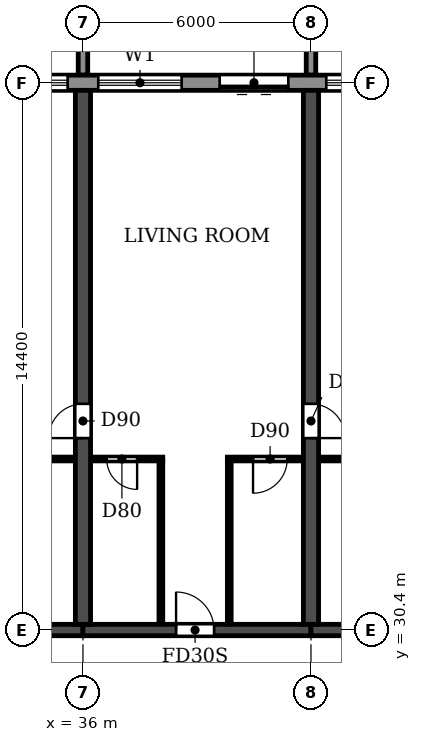
"""IFC4 building model, lengths in metres.
Left out: names, types, materials, properties, quantities, classifications, styles, units other than length and angle.
Written with IfcOpenShell. Run it as: python <this file> out.ifc"""

import sys

from ifc_helpers import new_model, si_unit, direction, frame, frame_2d, origin, place, context, subcontext, project, spatial, polyline, rectangle, outline, extrude, source, transform, mapped, element, fill, save


model = new_model("IFC4")
c1 = context("Model", 3, precision=1e-05, world=origin(), true_north=direction((0.0, 1.0)))
c2 = subcontext(c1, "Body", "Model", "MODEL_VIEW")
j1 = project(units=[si_unit("LENGTHUNIT", "METRE"), si_unit("PLANEANGLEUNIT", "RADIAN")], contexts=[c1])
p1 = place(None, origin())
s1 = spatial("IfcSite", under=j1, at=p1, CompositionType="ELEMENT")
p2 = place(p1, origin())
s2 = spatial("IfcBuilding", under=s1, at=p2, CompositionType="ELEMENT")
p3 = place(p2, frame((0.0, 0.0, 33.3)))
s3 = spatial("IfcBuildingStorey", under=s2, at=p3, CompositionType="ELEMENT", Elevation=33.3)
p4 = place(p3, frame((36.0, 30.55, 0.0), z_axis=(0.0, 0.0, 1.0), x_axis=(0.0, 1.0, 0.0)))
e1 = element("IfcWall", 1, at=p4, inside=s3, PredefinedType="SHEAR", context=c2, shape_type="SweptSolid", body=[
    extrude(rectangle(XDim=14.05, YDim=0.4, at=frame_2d((7.025, 0.0))), origin(), (0.0, 0.0, 1.0), 3.05),
])
p5 = place(p4, frame((4.9, 0.0, 0.0)))
e2 = element("IfcOpeningElement", 2, at=p5, cuts=e1, PredefinedType="OPENING", context=c2, shape_type="SweptSolid", body=[
    extrude(rectangle(XDim=0.9, YDim=2.1, at=frame_2d((0.45, 1.05))), frame((0.0, 0.21, 0.0), z_axis=(0.0, -1.0, 0.0), x_axis=(1.0, 0.0, 0.0)), (0.0, 0.0, 1.0), 0.42),
])
p6 = place(p3, frame((42.0, 30.55, 0.0), z_axis=(0.0, 0.0, 1.0), x_axis=(0.0, 1.0, 0.0)))
e3 = element("IfcWall", 3, at=p6, inside=s3, PredefinedType="SHEAR", context=c2, shape_type="SweptSolid", body=[
    extrude(rectangle(XDim=14.05, YDim=0.4, at=frame_2d((7.025, 0.0))), origin(), (0.0, 0.0, 1.0), 3.05),
])
p7 = place(p6, frame((4.9, 0.0, 0.0)))
e4 = element("IfcOpeningElement", 4, at=p7, cuts=e3, PredefinedType="OPENING", context=c2, shape_type="SweptSolid", body=[
    extrude(rectangle(XDim=0.9, YDim=2.1, at=frame_2d((0.45, 1.05))), frame((0.0, 0.21, 0.0), z_axis=(0.0, -1.0, 0.0), x_axis=(1.0, 0.0, 0.0)), (0.0, 0.0, 1.0), 0.42),
])
p8 = place(p3, frame((30.0, 30.4, 0.0), z_axis=(0.0, 0.0, 1.0), x_axis=(1.0, 0.0, 0.0)))
e5 = element("IfcWall", 5, at=p8, inside=s3, PredefinedType="SHEAR", context=c2, shape_type="SweptSolid", body=[
    extrude(rectangle(XDim=6.0, YDim=0.3, at=frame_2d((3.0, 0.0))), origin(), (0.0, 0.0, 1.0), 2.45),
])
p9 = place(p3, frame((36.0, 30.4, 0.0), z_axis=(0.0, 0.0, 1.0), x_axis=(1.0, 0.0, 0.0)))
e6 = element("IfcWall", 6, at=p9, inside=s3, PredefinedType="SHEAR", context=c2, shape_type="SweptSolid", body=[
    extrude(rectangle(XDim=6.0, YDim=0.3, at=frame_2d((3.0, 0.0))), origin(), (0.0, 0.0, 1.0), 2.45),
])
p10 = place(p9, frame((2.45, 0.0, 0.0)))
e7 = element("IfcOpeningElement", 7, at=p10, cuts=e6, PredefinedType="OPENING", context=c2, shape_type="SweptSolid", body=[
    extrude(rectangle(XDim=1.0, YDim=2.1, at=frame_2d((0.5, 1.05))), frame((0.0, 0.16, 0.0), z_axis=(0.0, -1.0, 0.0), x_axis=(1.0, 0.0, 0.0)), (0.0, 0.0, 1.0), 0.32),
])
p11 = place(p3, frame((42.0, 30.4, 0.0), z_axis=(0.0, 0.0, 1.0), x_axis=(1.0, 0.0, 0.0)))
e8 = element("IfcWall", 8, at=p11, inside=s3, PredefinedType="SHEAR", context=c2, shape_type="SweptSolid", body=[
    extrude(rectangle(XDim=6.0, YDim=0.3, at=frame_2d((3.0, 0.0))), origin(), (0.0, 0.0, 1.0), 2.45),
])
p12 = place(p3, frame((97.317, 44.8, 0.0), z_axis=(0.0, 0.0, 1.0), x_axis=(-1.0, 0.0, 0.0)))
e9 = element("IfcWall", 9, at=p12, inside=s3, PredefinedType="STANDARD", context=c2, shape_type="SweptSolid", body=[
    extrude(rectangle(XDim=92.634, YDim=0.4, at=frame_2d((46.317, 0.0))), origin(), (0.0, 0.0, 1.0), 3.05),
])
p13 = place(p12, frame((88.717, 0.0, 0.9)))
e10 = element("IfcOpeningElement", 10, at=p13, cuts=e9, PredefinedType="OPENING", context=c2, shape_type="SweptSolid", body=[
    extrude(rectangle(XDim=2.2, YDim=1.5, at=frame_2d((1.1, 0.75))), frame((0.0, 0.21, 0.0), z_axis=(0.0, -1.0, 0.0), x_axis=(1.0, 0.0, 0.0)), (0.0, 0.0, 1.0), 0.42),
])
p14 = place(p12, frame((85.917, 0.0, 0.0)))
e11 = element("IfcOpeningElement", 11, at=p14, cuts=e9, PredefinedType="OPENING", context=c2, shape_type="SweptSolid", body=[
    extrude(rectangle(XDim=1.8, YDim=2.4, at=frame_2d((0.9, 1.2))), frame((0.0, 0.21, 0.0), z_axis=(0.0, -1.0, 0.0), x_axis=(1.0, 0.0, 0.0)), (0.0, 0.0, 1.0), 0.42),
])
p15 = place(p12, frame((82.717, 0.0, 0.9)))
e12 = element("IfcOpeningElement", 12, at=p15, cuts=e9, PredefinedType="OPENING", context=c2, shape_type="SweptSolid", body=[
    extrude(rectangle(XDim=2.2, YDim=1.5, at=frame_2d((1.1, 0.75))), frame((0.0, 0.21, 0.0), z_axis=(0.0, -1.0, 0.0), x_axis=(1.0, 0.0, 0.0)), (0.0, 0.0, 1.0), 0.42),
])
p16 = place(p12, frame((79.917, 0.0, 0.0)))
e13 = element("IfcOpeningElement", 13, at=p16, cuts=e9, PredefinedType="OPENING", context=c2, shape_type="SweptSolid", body=[
    extrude(rectangle(XDim=1.8, YDim=2.4, at=frame_2d((0.9, 1.2))), frame((0.0, 0.21, 0.0), z_axis=(0.0, -1.0, 0.0), x_axis=(1.0, 0.0, 0.0)), (0.0, 0.0, 1.0), 0.42),
])
p17 = place(p12, frame((76.717, 0.0, 0.9)))
e14 = element("IfcOpeningElement", 14, at=p17, cuts=e9, PredefinedType="OPENING", context=c2, shape_type="SweptSolid", body=[
    extrude(rectangle(XDim=2.2, YDim=1.5, at=frame_2d((1.1, 0.75))), frame((0.0, 0.21, 0.0), z_axis=(0.0, -1.0, 0.0), x_axis=(1.0, 0.0, 0.0)), (0.0, 0.0, 1.0), 0.42),
])
p18 = place(p12, frame((73.717, 0.0, 0.9)))
e15 = element("IfcOpeningElement", 15, at=p18, cuts=e9, PredefinedType="OPENING", context=c2, shape_type="SweptSolid", body=[
    extrude(rectangle(XDim=2.2, YDim=1.5, at=frame_2d((1.1, 0.75))), frame((0.0, 0.21, 0.0), z_axis=(0.0, -1.0, 0.0), x_axis=(1.0, 0.0, 0.0)), (0.0, 0.0, 1.0), 0.42),
])
p19 = place(p12, frame((70.717, 0.0, 0.9)))
e16 = element("IfcOpeningElement", 16, at=p19, cuts=e9, PredefinedType="OPENING", context=c2, shape_type="SweptSolid", body=[
    extrude(rectangle(XDim=2.2, YDim=1.5, at=frame_2d((1.1, 0.75))), frame((0.0, 0.21, 0.0), z_axis=(0.0, -1.0, 0.0), x_axis=(1.0, 0.0, 0.0)), (0.0, 0.0, 1.0), 0.42),
])
p20 = place(p12, frame((67.917, 0.0, 0.0)))
e17 = element("IfcOpeningElement", 17, at=p20, cuts=e9, PredefinedType="OPENING", context=c2, shape_type="SweptSolid", body=[
    extrude(rectangle(XDim=1.8, YDim=2.4, at=frame_2d((0.9, 1.2))), frame((0.0, 0.21, 0.0), z_axis=(0.0, -1.0, 0.0), x_axis=(1.0, 0.0, 0.0)), (0.0, 0.0, 1.0), 0.42),
])
p21 = place(p12, frame((64.717, 0.0, 0.9)))
e18 = element("IfcOpeningElement", 18, at=p21, cuts=e9, PredefinedType="OPENING", context=c2, shape_type="SweptSolid", body=[
    extrude(rectangle(XDim=2.2, YDim=1.5, at=frame_2d((1.1, 0.75))), frame((0.0, 0.21, 0.0), z_axis=(0.0, -1.0, 0.0), x_axis=(1.0, 0.0, 0.0)), (0.0, 0.0, 1.0), 0.42),
])
p22 = place(p12, frame((61.717, 0.0, 0.9)))
e19 = element("IfcOpeningElement", 19, at=p22, cuts=e9, PredefinedType="OPENING", context=c2, shape_type="SweptSolid", body=[
    extrude(rectangle(XDim=2.2, YDim=1.5, at=frame_2d((1.1, 0.75))), frame((0.0, 0.21, 0.0), z_axis=(0.0, -1.0, 0.0), x_axis=(1.0, 0.0, 0.0)), (0.0, 0.0, 1.0), 0.42),
])
p23 = place(p12, frame((58.717, 0.0, 0.9)))
e20 = element("IfcOpeningElement", 20, at=p23, cuts=e9, PredefinedType="OPENING", context=c2, shape_type="SweptSolid", body=[
    extrude(rectangle(XDim=2.2, YDim=1.5, at=frame_2d((1.1, 0.75))), frame((0.0, 0.21, 0.0), z_axis=(0.0, -1.0, 0.0), x_axis=(1.0, 0.0, 0.0)), (0.0, 0.0, 1.0), 0.42),
])
p24 = place(p12, frame((55.917, 0.0, 0.0)))
e21 = element("IfcOpeningElement", 21, at=p24, cuts=e9, PredefinedType="OPENING", context=c2, shape_type="SweptSolid", body=[
    extrude(rectangle(XDim=1.8, YDim=2.4, at=frame_2d((0.9, 1.2))), frame((0.0, 0.21, 0.0), z_axis=(0.0, -1.0, 0.0), x_axis=(1.0, 0.0, 0.0)), (0.0, 0.0, 1.0), 0.42),
])
p25 = place(p12, frame((52.717, 0.0, 0.9)))
e22 = element("IfcOpeningElement", 22, at=p25, cuts=e9, PredefinedType="OPENING", context=c2, shape_type="SweptSolid", body=[
    extrude(rectangle(XDim=2.2, YDim=1.5, at=frame_2d((1.1, 0.75))), frame((0.0, 0.21, 0.0), z_axis=(0.0, -1.0, 0.0), x_axis=(1.0, 0.0, 0.0)), (0.0, 0.0, 1.0), 0.42),
])
p26 = place(p12, frame((49.717, 0.0, 0.9)))
e23 = element("IfcOpeningElement", 23, at=p26, cuts=e9, PredefinedType="OPENING", context=c2, shape_type="SweptSolid", body=[
    extrude(rectangle(XDim=2.2, YDim=1.5, at=frame_2d((1.1, 0.75))), frame((0.0, 0.21, 0.0), z_axis=(0.0, -1.0, 0.0), x_axis=(1.0, 0.0, 0.0)), (0.0, 0.0, 1.0), 0.42),
])
p27 = place(p12, frame((46.717, 0.0, 0.9)))
e24 = element("IfcOpeningElement", 24, at=p27, cuts=e9, PredefinedType="OPENING", context=c2, shape_type="SweptSolid", body=[
    extrude(rectangle(XDim=2.2, YDim=1.5, at=frame_2d((1.1, 0.75))), frame((0.0, 0.21, 0.0), z_axis=(0.0, -1.0, 0.0), x_axis=(1.0, 0.0, 0.0)), (0.0, 0.0, 1.0), 0.42),
])
p28 = place(p12, frame((43.917, 0.0, 0.0)))
e25 = element("IfcOpeningElement", 25, at=p28, cuts=e9, PredefinedType="OPENING", context=c2, shape_type="SweptSolid", body=[
    extrude(rectangle(XDim=1.8, YDim=2.4, at=frame_2d((0.9, 1.2))), frame((0.0, 0.21, 0.0), z_axis=(0.0, -1.0, 0.0), x_axis=(1.0, 0.0, 0.0)), (0.0, 0.0, 1.0), 0.42),
])
p29 = place(p12, frame((40.717, 0.0, 0.9)))
e26 = element("IfcOpeningElement", 26, at=p29, cuts=e9, PredefinedType="OPENING", context=c2, shape_type="SweptSolid", body=[
    extrude(rectangle(XDim=2.2, YDim=1.5, at=frame_2d((1.1, 0.75))), frame((0.0, 0.21, 0.0), z_axis=(0.0, -1.0, 0.0), x_axis=(1.0, 0.0, 0.0)), (0.0, 0.0, 1.0), 0.42),
])
p30 = place(p12, frame((37.717, 0.0, 0.9)))
e27 = element("IfcOpeningElement", 27, at=p30, cuts=e9, PredefinedType="OPENING", context=c2, shape_type="SweptSolid", body=[
    extrude(rectangle(XDim=2.2, YDim=1.5, at=frame_2d((1.1, 0.75))), frame((0.0, 0.21, 0.0), z_axis=(0.0, -1.0, 0.0), x_axis=(1.0, 0.0, 0.0)), (0.0, 0.0, 1.0), 0.42),
])
p31 = place(p12, frame((34.717, 0.0, 0.9)))
e28 = element("IfcOpeningElement", 28, at=p31, cuts=e9, PredefinedType="OPENING", context=c2, shape_type="SweptSolid", body=[
    extrude(rectangle(XDim=2.2, YDim=1.5, at=frame_2d((1.1, 0.75))), frame((0.0, 0.21, 0.0), z_axis=(0.0, -1.0, 0.0), x_axis=(1.0, 0.0, 0.0)), (0.0, 0.0, 1.0), 0.42),
])
p32 = place(p12, frame((31.917, 0.0, 0.0)))
e29 = element("IfcOpeningElement", 29, at=p32, cuts=e9, PredefinedType="OPENING", context=c2, shape_type="SweptSolid", body=[
    extrude(rectangle(XDim=1.8, YDim=2.4, at=frame_2d((0.9, 1.2))), frame((0.0, 0.21, 0.0), z_axis=(0.0, -1.0, 0.0), x_axis=(1.0, 0.0, 0.0)), (0.0, 0.0, 1.0), 0.42),
])
p33 = place(p12, frame((28.717, 0.0, 0.9)))
e30 = element("IfcOpeningElement", 30, at=p33, cuts=e9, PredefinedType="OPENING", context=c2, shape_type="SweptSolid", body=[
    extrude(rectangle(XDim=2.2, YDim=1.5, at=frame_2d((1.1, 0.75))), frame((0.0, 0.21, 0.0), z_axis=(0.0, -1.0, 0.0), x_axis=(1.0, 0.0, 0.0)), (0.0, 0.0, 1.0), 0.42),
])
p34 = place(p12, frame((25.717, 0.0, 0.9)))
e31 = element("IfcOpeningElement", 31, at=p34, cuts=e9, PredefinedType="OPENING", context=c2, shape_type="SweptSolid", body=[
    extrude(rectangle(XDim=2.2, YDim=1.5, at=frame_2d((1.1, 0.75))), frame((0.0, 0.21, 0.0), z_axis=(0.0, -1.0, 0.0), x_axis=(1.0, 0.0, 0.0)), (0.0, 0.0, 1.0), 0.42),
])
p35 = place(p12, frame((22.917, 0.0, 0.0)))
e32 = element("IfcOpeningElement", 32, at=p35, cuts=e9, PredefinedType="OPENING", context=c2, shape_type="SweptSolid", body=[
    extrude(rectangle(XDim=1.8, YDim=2.4, at=frame_2d((0.9, 1.2))), frame((0.0, 0.21, 0.0), z_axis=(0.0, -1.0, 0.0), x_axis=(1.0, 0.0, 0.0)), (0.0, 0.0, 1.0), 0.42),
])
p36 = place(p12, frame((19.717, 0.0, 0.9)))
e33 = element("IfcOpeningElement", 33, at=p36, cuts=e9, PredefinedType="OPENING", context=c2, shape_type="SweptSolid", body=[
    extrude(rectangle(XDim=2.2, YDim=1.5, at=frame_2d((1.1, 0.75))), frame((0.0, 0.21, 0.0), z_axis=(0.0, -1.0, 0.0), x_axis=(1.0, 0.0, 0.0)), (0.0, 0.0, 1.0), 0.42),
])
p37 = place(p12, frame((16.717, 0.0, 0.9)))
e34 = element("IfcOpeningElement", 34, at=p37, cuts=e9, PredefinedType="OPENING", context=c2, shape_type="SweptSolid", body=[
    extrude(rectangle(XDim=2.2, YDim=1.5, at=frame_2d((1.1, 0.75))), frame((0.0, 0.21, 0.0), z_axis=(0.0, -1.0, 0.0), x_axis=(1.0, 0.0, 0.0)), (0.0, 0.0, 1.0), 0.42),
])
p38 = place(p12, frame((13.917, 0.0, 0.0)))
e35 = element("IfcOpeningElement", 35, at=p38, cuts=e9, PredefinedType="OPENING", context=c2, shape_type="SweptSolid", body=[
    extrude(rectangle(XDim=1.8, YDim=2.4, at=frame_2d((0.9, 1.2))), frame((0.0, 0.21, 0.0), z_axis=(0.0, -1.0, 0.0), x_axis=(1.0, 0.0, 0.0)), (0.0, 0.0, 1.0), 0.42),
])
p39 = place(p12, frame((10.717, 0.0, 0.9)))
e36 = element("IfcOpeningElement", 36, at=p39, cuts=e9, PredefinedType="OPENING", context=c2, shape_type="SweptSolid", body=[
    extrude(rectangle(XDim=2.2, YDim=1.5, at=frame_2d((1.1, 0.75))), frame((0.0, 0.21, 0.0), z_axis=(0.0, -1.0, 0.0), x_axis=(1.0, 0.0, 0.0)), (0.0, 0.0, 1.0), 0.42),
])
p40 = place(p12, frame((7.917, 0.0, 0.0)))
e37 = element("IfcOpeningElement", 37, at=p40, cuts=e9, PredefinedType="OPENING", context=c2, shape_type="SweptSolid", body=[
    extrude(rectangle(XDim=1.8, YDim=2.4, at=frame_2d((0.9, 1.2))), frame((0.0, 0.21, 0.0), z_axis=(0.0, -1.0, 0.0), x_axis=(1.0, 0.0, 0.0)), (0.0, 0.0, 1.0), 0.42),
])
p41 = place(p12, frame((4.717, 0.0, 0.9)))
e38 = element("IfcOpeningElement", 38, at=p41, cuts=e9, PredefinedType="OPENING", context=c2, shape_type="SweptSolid", body=[
    extrude(rectangle(XDim=2.2, YDim=1.5, at=frame_2d((1.1, 0.75))), frame((0.0, 0.21, 0.0), z_axis=(0.0, -1.0, 0.0), x_axis=(1.0, 0.0, 0.0)), (0.0, 0.0, 1.0), 0.42),
])
p42 = place(p12, frame((1.917, 0.0, 0.0)))
e39 = element("IfcOpeningElement", 39, at=p42, cuts=e9, PredefinedType="OPENING", context=c2, shape_type="SweptSolid", body=[
    extrude(rectangle(XDim=1.8, YDim=2.4, at=frame_2d((0.9, 1.2))), frame((0.0, 0.21, 0.0), z_axis=(0.0, -1.0, 0.0), x_axis=(1.0, 0.0, 0.0)), (0.0, 0.0, 1.0), 0.42),
])
m1 = source(origin(), c2, "Body", "SweptSolid", [
    extrude(outline(polyline([(0.0, 0.0), (0.25, 0.0), (0.25, 3.1), (0.0, 3.1), (0.0, 0.0)])), origin(), (0.0, 0.0, 1.0), 3.1),
])
for number, where in (
    (40, (35.875, 45.0, 0.0)),
    (41, (41.875, 45.0, 0.0)),
):
    element("IfcWall", number, at=place(p3, frame(where)), inside=s3, PredefinedType="STANDARD", context=c2, shape_type="MappedRepresentation", body=[
        mapped(m1, transform((0.0, 0.0, 0.0))),
    ])
p43 = place(p3, frame((33.1, 34.9, 0.0), z_axis=(0.0, 0.0, 1.0), x_axis=(1.0, 0.0, 0.0)))
e42 = element("IfcWall", 42, at=p43, inside=s3, PredefinedType="PARTITIONING", context=c2, shape_type="SweptSolid", body=[
    extrude(rectangle(XDim=2.69, YDim=0.1, at=frame_2d((1.345, 0.0))), origin(), (0.0, 0.0, 1.0), 3.05),
])
p44 = place(p43, frame((1.0, 0.0, 0.0)))
e43 = element("IfcOpeningElement", 43, at=p44, cuts=e42, PredefinedType="OPENING", context=c2, shape_type="SweptSolid", body=[
    extrude(rectangle(XDim=0.8, YDim=2.1, at=frame_2d((0.4, 1.05))), frame((0.0, 0.06, 0.0), z_axis=(0.0, -1.0, 0.0), x_axis=(1.0, 0.0, 0.0)), (0.0, 0.0, 1.0), 0.12),
])
p45 = place(p3, frame((36.21, 34.9, 0.0), z_axis=(0.0, 0.0, 1.0), x_axis=(1.0, 0.0, 0.0)))
e44 = element("IfcWall", 44, at=p45, inside=s3, PredefinedType="PARTITIONING", context=c2, shape_type="SweptSolid", body=[
    extrude(rectangle(XDim=1.89, YDim=0.1, at=frame_2d((0.945, 0.0))), origin(), (0.0, 0.0, 1.0), 3.05),
])
p46 = place(p45, frame((0.415, 0.0, 0.0)))
e45 = element("IfcOpeningElement", 45, at=p46, cuts=e44, PredefinedType="OPENING", context=c2, shape_type="SweptSolid", body=[
    extrude(rectangle(XDim=0.8, YDim=2.1, at=frame_2d((0.4, 1.05))), frame((0.0, 0.06, 0.0), z_axis=(0.0, -1.0, 0.0), x_axis=(1.0, 0.0, 0.0)), (0.0, 0.0, 1.0), 0.12),
])
p47 = place(p3, frame((39.8, 34.9, 0.0), z_axis=(0.0, 0.0, 1.0), x_axis=(1.0, 0.0, 0.0)))
e46 = element("IfcWall", 46, at=p47, inside=s3, PredefinedType="PARTITIONING", context=c2, shape_type="SweptSolid", body=[
    extrude(rectangle(XDim=1.99, YDim=0.1, at=frame_2d((0.995, 0.0))), origin(), (0.0, 0.0, 1.0), 3.05),
])
p48 = place(p47, frame((0.675, 0.0, 0.0)))
e47 = element("IfcOpeningElement", 47, at=p48, cuts=e46, PredefinedType="OPENING", context=c2, shape_type="SweptSolid", body=[
    extrude(rectangle(XDim=0.9, YDim=2.1, at=frame_2d((0.45, 1.05))), frame((0.0, 0.06, 0.0), z_axis=(0.0, -1.0, 0.0), x_axis=(1.0, 0.0, 0.0)), (0.0, 0.0, 1.0), 0.12),
])
p49 = place(p3, frame((42.21, 34.9, 0.0), z_axis=(0.0, 0.0, 1.0), x_axis=(1.0, 0.0, 0.0)))
e48 = element("IfcWall", 48, at=p49, inside=s3, PredefinedType="PARTITIONING", context=c2, shape_type="SweptSolid", body=[
    extrude(rectangle(XDim=2.69, YDim=0.1, at=frame_2d((1.345, 0.0))), origin(), (0.0, 0.0, 1.0), 3.05),
])
p50 = place(p49, frame((0.89, 0.0, 0.0)))
e49 = element("IfcOpeningElement", 49, at=p50, cuts=e48, PredefinedType="OPENING", context=c2, shape_type="SweptSolid", body=[
    extrude(rectangle(XDim=0.8, YDim=2.1, at=frame_2d((0.4, 1.05))), frame((0.0, 0.06, 0.0), z_axis=(0.0, -1.0, 0.0), x_axis=(1.0, 0.0, 0.0)), (0.0, 0.0, 1.0), 0.12),
])
for number, where, z_axis, x_axis in (
    (50, (38.05, 30.56, 0.0), (0.0, 0.0, 1.0), (0.0, 1.0, 0.0)),
    (51, (39.85, 30.56, 0.0), (0.0, 0.0, 1.0), (0.0, 1.0, 0.0)),
):
    element("IfcWall", number, at=place(p3, frame(where, z_axis=z_axis, x_axis=x_axis)), inside=s3, PredefinedType="PARTITIONING", context=c2, shape_type="SweptSolid", body=[
        extrude(rectangle(XDim=4.29, YDim=0.1, at=frame_2d((2.145, 0.0))), origin(), (0.0, 0.0, 1.0), 3.05),
    ])
p51 = place(p22, origin())
e52 = element("IfcWindow", 52, at=p51, inside=s3, PartitioningType="DOUBLE_PANEL_HORIZONTAL", PredefinedType="WINDOW", context=c2, shape_type="SweptSolid", body=[
    extrude(rectangle(XDim=2.2, YDim=1.5, at=frame_2d((1.1, 0.75))), frame((0.0, 0.03, 0.0), z_axis=(0.0, -1.0, 0.0), x_axis=(1.0, 0.0, 0.0)), (0.0, 0.0, 1.0), 0.06),
])
fill(e19, e52)
p52 = place(p23, origin())
e53 = element("IfcWindow", 53, at=p52, inside=s3, PartitioningType="DOUBLE_PANEL_HORIZONTAL", PredefinedType="WINDOW", context=c2, shape_type="SweptSolid", body=[
    extrude(rectangle(XDim=2.2, YDim=1.5, at=frame_2d((1.1, 0.75))), frame((0.0, 0.03, 0.0), z_axis=(0.0, -1.0, 0.0), x_axis=(1.0, 0.0, 0.0)), (0.0, 0.0, 1.0), 0.06),
])
fill(e20, e53)
p53 = place(p24, origin())
e54 = element("IfcDoor", 54, at=p53, inside=s3, OperationType="DOUBLE_DOOR_SLIDING", PredefinedType="DOOR", context=c2, shape_type="SweptSolid", body=[
    extrude(rectangle(XDim=1.8, YDim=2.4, at=frame_2d((0.9, 1.2))), frame((0.0, 0.025, 0.0), z_axis=(0.0, -1.0, 0.0), x_axis=(1.0, 0.0, 0.0)), (0.0, 0.0, 1.0), 0.05),
])
fill(e21, e54)
p54 = place(p25, origin())
e55 = element("IfcWindow", 55, at=p54, inside=s3, PartitioningType="DOUBLE_PANEL_HORIZONTAL", PredefinedType="WINDOW", context=c2, shape_type="SweptSolid", body=[
    extrude(rectangle(XDim=2.2, YDim=1.5, at=frame_2d((1.1, 0.75))), frame((0.0, 0.03, 0.0), z_axis=(0.0, -1.0, 0.0), x_axis=(1.0, 0.0, 0.0)), (0.0, 0.0, 1.0), 0.06),
])
fill(e22, e55)
p55 = place(p5, origin())
e56 = element("IfcDoor", 56, at=p55, inside=s3, OperationType="SINGLE_SWING_LEFT", PredefinedType="DOOR", context=c2, shape_type="SweptSolid", body=[
    extrude(rectangle(XDim=0.9, YDim=2.1, at=frame_2d((0.45, 1.05))), frame((0.0, 0.025, 0.0), z_axis=(0.0, -1.0, 0.0), x_axis=(1.0, 0.0, 0.0)), (0.0, 0.0, 1.0), 0.05),
])
fill(e2, e56)
p56 = place(p46, frame((0.8, 0.0, 0.0), z_axis=(0.0, 0.0, 1.0), x_axis=(-1.0, 0.0, 0.0)))
e57 = element("IfcDoor", 57, at=p56, inside=s3, OperationType="SINGLE_SWING_LEFT", PredefinedType="DOOR", context=c2, shape_type="SweptSolid", body=[
    extrude(rectangle(XDim=0.8, YDim=2.1, at=frame_2d((0.4, 1.05))), frame((0.0, 0.025, 0.0), z_axis=(0.0, -1.0, 0.0), x_axis=(1.0, 0.0, 0.0)), (0.0, 0.0, 1.0), 0.05),
])
fill(e45, e57)
p57 = place(p10, origin())
e58 = element("IfcDoor", 58, at=p57, inside=s3, OperationType="SINGLE_SWING_LEFT", PredefinedType="DOOR", context=c2, shape_type="SweptSolid", body=[
    extrude(rectangle(XDim=1.0, YDim=2.1, at=frame_2d((0.5, 1.05))), frame((0.0, 0.025, 0.0), z_axis=(0.0, -1.0, 0.0), x_axis=(1.0, 0.0, 0.0)), (0.0, 0.0, 1.0), 0.05),
])
fill(e7, e58)
p58 = place(p48, frame((0.9, 0.0, 0.0), z_axis=(0.0, 0.0, 1.0), x_axis=(-1.0, 0.0, 0.0)))
e59 = element("IfcDoor", 59, at=p58, inside=s3, OperationType="SINGLE_SWING_RIGHT", PredefinedType="DOOR", context=c2, shape_type="SweptSolid", body=[
    extrude(rectangle(XDim=0.9, YDim=2.1, at=frame_2d((0.45, 1.05))), frame((0.0, 0.025, 0.0), z_axis=(0.0, -1.0, 0.0), x_axis=(1.0, 0.0, 0.0)), (0.0, 0.0, 1.0), 0.05),
])
fill(e47, e59)
p59 = place(p7, frame((0.9, 0.0, 0.0), z_axis=(0.0, 0.0, 1.0), x_axis=(-1.0, 0.0, 0.0)))
e60 = element("IfcDoor", 60, at=p59, inside=s3, OperationType="SINGLE_SWING_RIGHT", PredefinedType="DOOR", context=c2, shape_type="SweptSolid", body=[
    extrude(rectangle(XDim=0.9, YDim=2.1, at=frame_2d((0.45, 1.05))), frame((0.0, 0.025, 0.0), z_axis=(0.0, -1.0, 0.0), x_axis=(1.0, 0.0, 0.0)), (0.0, 0.0, 1.0), 0.05),
])
fill(e4, e60)
save(model, sys.argv[1])
